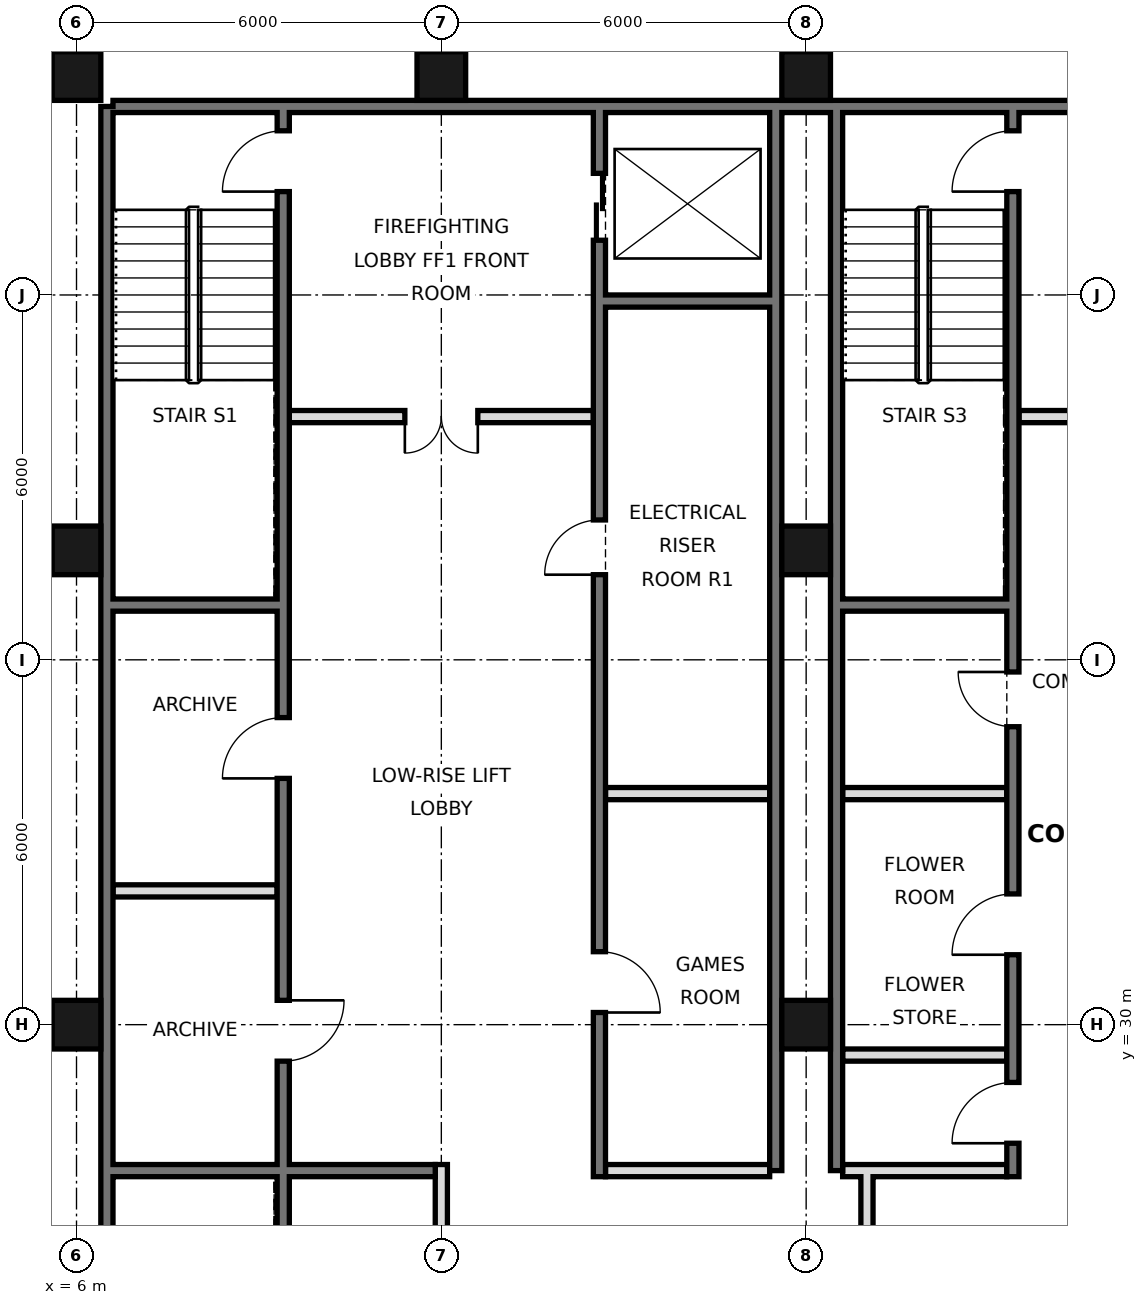
"""IFC4 building model, lengths in metres.
Left out: names, types, materials, properties, quantities, classifications, styles, units other than length and angle.
Written with IfcOpenShell. Run it as: python <this file> out.ifc"""

import sys

from ifc_helpers import new_model, si_unit, direction, frame, frame_2d, origin, origin_2d, place, context, subcontext, project, spatial, rectangle, hollow_rectangle, extrude, element, fill, save


model = new_model("IFC4")
c1 = context("Model", 3, precision=1e-05, world=origin(), true_north=direction((0.0, 1.0)))
c2 = subcontext(c1, "Body", "Model", "MODEL_VIEW")
j1 = project(units=[si_unit("LENGTHUNIT", "METRE"), si_unit("PLANEANGLEUNIT", "RADIAN")], contexts=[c1])
p1 = place(None, origin())
s1 = spatial("IfcSite", under=j1, at=p1, CompositionType="ELEMENT")
p2 = place(p1, origin())
s2 = spatial("IfcBuilding", under=s1, at=p2, CompositionType="ELEMENT")
p3 = place(p2, frame((0.0, 0.0, 308.8)))
s3 = spatial("IfcBuildingStorey", under=s2, at=p3, CompositionType="ELEMENT", Elevation=308.8)
for number, where, z_axis, x_axis in (
    (1, (6.0, 30.0, 0.0), (0.0, 0.0, 1.0), (1.0, 0.0, 0.0)),
    (2, (6.0, 37.8, 0.0), (0.0, 0.0, 1.0), (1.0, 0.0, 0.0)),
    (3, (6.0, 45.6, 0.0), (0.0, 0.0, 1.0), (1.0, 0.0, 0.0)),
    (4, (12.0, 45.6, 0.0), (0.0, 0.0, 1.0), (1.0, 0.0, 0.0)),
    (5, (18.0, 30.0, 0.0), (0.0, 0.0, 1.0), (1.0, 0.0, 0.0)),
    (6, (18.0, 37.8, 0.0), (0.0, 0.0, 1.0), (1.0, 0.0, 0.0)),
    (7, (18.0, 45.6, 0.0), (0.0, 0.0, 1.0), (1.0, 0.0, 0.0)),
):
    element("IfcColumn", number, at=place(p3, frame(where, z_axis=z_axis, x_axis=x_axis)), inside=s3, PredefinedType="COLUMN", context=c2, shape_type="SweptSolid", body=[
        extrude(hollow_rectangle(XDim=0.8, YDim=0.8, WallThickness=0.025, at=origin_2d()), origin(), (0.0, 0.0, 1.0), 3.6),
    ])
p4 = place(p3, frame((6.5, 21.6, 0.0), z_axis=(0.0, 0.0, 1.0), x_axis=(0.0, 1.0, 0.0)))
e8 = element("IfcWall", 8, at=p4, inside=s3, PredefinedType="SOLIDWALL", context=c2, shape_type="SweptSolid", body=[
    extrude(rectangle(XDim=23.5, YDim=0.2, at=frame_2d((11.75, 0.0))), origin(), (0.0, 0.0, 1.0), 3.42),
])
p5 = place(p3, frame((6.6, 45.1, 0.0), z_axis=(0.0, 0.0, 1.0), x_axis=(1.0, 0.0, 0.0)))
e9 = element("IfcWall", 9, at=p5, inside=s3, PredefinedType="SOLIDWALL", context=c2, shape_type="SweptSolid", body=[
    extrude(rectangle(XDim=34.8, YDim=0.2, at=frame_2d((17.4, 0.0))), origin(), (0.0, 0.0, 1.0), 3.42),
])
for number, where, z_axis, x_axis in (
    (10, (17.5, 27.6, 0.0), (0.0, 0.0, 1.0), (0.0, 1.0, 0.0)),
    (11, (18.5, 27.6, 0.0), (0.0, 0.0, 1.0), (0.0, 1.0, 0.0)),
):
    element("IfcWall", number, at=place(p3, frame(where, z_axis=z_axis, x_axis=x_axis)), inside=s3, PredefinedType="SOLIDWALL", context=c2, shape_type="SweptSolid", body=[
        extrude(rectangle(XDim=17.5, YDim=0.2, at=frame_2d((8.75, 0.0))), origin(), (0.0, 0.0, 1.0), 3.42),
    ])
p6 = place(p3, frame((19.0, 21.6, 0.0), z_axis=(0.0, 0.0, 1.0), x_axis=(0.0, 1.0, 0.0)))
e12 = element("IfcWall", 12, at=p6, inside=s3, PredefinedType="PARTITIONING", context=c2, shape_type="SweptSolid", body=[
    extrude(rectangle(XDim=6.0, YDim=0.2, at=frame_2d((3.0, 0.0))), origin(), (0.0, 0.0, 1.0), 3.42),
])
p7 = place(p6, frame((2.1, 0.0, 0.0)))
e13 = element("IfcOpeningElement", 13, at=p7, cuts=e12, PredefinedType="OPENING", context=c2, shape_type="SweptSolid", body=[
    extrude(rectangle(XDim=1.8, YDim=2.1, at=frame_2d((0.9, 1.05))), frame((0.0, 0.11, 0.0), z_axis=(0.0, -1.0, 0.0), x_axis=(1.0, 0.0, 0.0)), (0.0, 0.0, 1.0), 0.22),
])
p8 = place(p3, frame((12.0, 21.6, 0.0), z_axis=(0.0, 0.0, 1.0), x_axis=(0.0, 1.0, 0.0)))
e14 = element("IfcWall", 14, at=p8, inside=s3, PredefinedType="PARTITIONING", context=c2, shape_type="SweptSolid", body=[
    extrude(rectangle(XDim=6.1, YDim=0.2, at=frame_2d((3.05, 0.0))), origin(), (0.0, 0.0, 1.0), 3.42),
])
p9 = place(p3, frame((14.6, 27.5, 0.0), z_axis=(0.0, 0.0, 1.0), x_axis=(0.0, 1.0, 0.0)))
e15 = element("IfcWall", 15, at=p9, inside=s3, PredefinedType="SOLIDWALL", context=c2, shape_type="SweptSolid", body=[
    extrude(rectangle(XDim=17.5, YDim=0.2, at=frame_2d((8.75, 0.0))), origin(), (0.0, 0.0, 1.0), 3.42),
])
p10 = place(p9, frame((15.4, 0.0, 0.0)))
e16 = element("IfcOpeningElement", 16, at=p10, cuts=e15, PredefinedType="OPENING", context=c2, shape_type="SweptSolid", body=[
    extrude(rectangle(XDim=1.1, YDim=2.1, at=frame_2d((0.55, 1.05))), frame((0.0, 0.11, 0.0), z_axis=(0.0, -1.0, 0.0), x_axis=(1.0, 0.0, 0.0)), (0.0, 0.0, 1.0), 0.22),
])
p11 = place(p9, frame((2.7, 0.0, 0.0)))
e17 = element("IfcOpeningElement", 17, at=p11, cuts=e15, PredefinedType="OPENING", context=c2, shape_type="SweptSolid", body=[
    extrude(rectangle(XDim=1.0, YDim=2.1, at=frame_2d((0.5, 1.05))), frame((0.0, 0.11, 0.0), z_axis=(0.0, -1.0, 0.0), x_axis=(1.0, 0.0, 0.0)), (0.0, 0.0, 1.0), 0.22),
])
p12 = place(p9, frame((9.9, 0.0, 0.0)))
e18 = element("IfcOpeningElement", 18, at=p12, cuts=e15, PredefinedType="OPENING", context=c2, shape_type="SweptSolid", body=[
    extrude(rectangle(XDim=0.9, YDim=2.1, at=frame_2d((0.45, 1.05))), frame((0.0, 0.11, 0.0), z_axis=(0.0, -1.0, 0.0), x_axis=(1.0, 0.0, 0.0)), (0.0, 0.0, 1.0), 0.22),
])
p13 = place(p3, frame((21.4, 27.5, 0.0), z_axis=(0.0, 0.0, 1.0), x_axis=(0.0, 1.0, 0.0)))
e19 = element("IfcWall", 19, at=p13, inside=s3, PredefinedType="SOLIDWALL", context=c2, shape_type="SweptSolid", body=[
    extrude(rectangle(XDim=17.5, YDim=0.2, at=frame_2d((8.75, 0.0))), origin(), (0.0, 0.0, 1.0), 3.42),
])
p14 = place(p13, frame((0.55, 0.0, 0.0)))
e20 = element("IfcOpeningElement", 20, at=p14, cuts=e19, PredefinedType="OPENING", context=c2, shape_type="SweptSolid", body=[
    extrude(rectangle(XDim=1.0, YDim=2.1, at=frame_2d((0.5, 1.05))), frame((0.0, 0.11, 0.0), z_axis=(0.0, -1.0, 0.0), x_axis=(1.0, 0.0, 0.0)), (0.0, 0.0, 1.0), 0.22),
])
p15 = place(p13, frame((3.65, 0.0, 0.0)))
e21 = element("IfcOpeningElement", 21, at=p15, cuts=e19, PredefinedType="OPENING", context=c2, shape_type="SweptSolid", body=[
    extrude(rectangle(XDim=1.0, YDim=2.1, at=frame_2d((0.5, 1.05))), frame((0.0, 0.11, 0.0), z_axis=(0.0, -1.0, 0.0), x_axis=(1.0, 0.0, 0.0)), (0.0, 0.0, 1.0), 0.22),
])
p16 = place(p13, frame((16.2, 0.0, 0.0)))
e22 = element("IfcOpeningElement", 22, at=p16, cuts=e19, PredefinedType="OPENING", context=c2, shape_type="SweptSolid", body=[
    extrude(rectangle(XDim=1.0, YDim=2.1, at=frame_2d((0.5, 1.05))), frame((0.0, 0.11, 0.0), z_axis=(0.0, -1.0, 0.0), x_axis=(1.0, 0.0, 0.0)), (0.0, 0.0, 1.0), 0.22),
])
p17 = place(p13, frame((7.4, 0.0, 0.0)))
e23 = element("IfcOpeningElement", 23, at=p17, cuts=e19, PredefinedType="OPENING", context=c2, shape_type="SweptSolid", body=[
    extrude(rectangle(XDim=0.9, YDim=2.1, at=frame_2d((0.45, 1.05))), frame((0.0, 0.11, 0.0), z_axis=(0.0, -1.0, 0.0), x_axis=(1.0, 0.0, 0.0)), (0.0, 0.0, 1.0), 0.22),
])
p18 = place(p3, frame((9.4, 21.6, 0.0), z_axis=(0.0, 0.0, 1.0), x_axis=(0.0, 1.0, 0.0)))
e24 = element("IfcWall", 24, at=p18, inside=s3, PredefinedType="SOLIDWALL", context=c2, shape_type="SweptSolid", body=[
    extrude(rectangle(XDim=23.4, YDim=0.2, at=frame_2d((11.7, 0.0))), origin(), (0.0, 0.0, 1.0), 3.42),
])
p19 = place(p18, frame((7.8, 0.0, 0.0)))
e25 = element("IfcOpeningElement", 25, at=p19, cuts=e24, PredefinedType="OPENING", context=c2, shape_type="SweptSolid", body=[
    extrude(rectangle(XDim=1.0, YDim=2.1, at=frame_2d((0.5, 1.05))), frame((0.0, 0.11, 0.0), z_axis=(0.0, -1.0, 0.0), x_axis=(1.0, 0.0, 0.0)), (0.0, 0.0, 1.0), 0.22),
])
p20 = place(p18, frame((12.45, 0.0, 0.0)))
e26 = element("IfcOpeningElement", 26, at=p20, cuts=e24, PredefinedType="OPENING", context=c2, shape_type="SweptSolid", body=[
    extrude(rectangle(XDim=1.0, YDim=2.1, at=frame_2d((0.5, 1.05))), frame((0.0, 0.11, 0.0), z_axis=(0.0, -1.0, 0.0), x_axis=(1.0, 0.0, 0.0)), (0.0, 0.0, 1.0), 0.22),
])
p21 = place(p18, frame((22.1, 0.0, 0.0)))
e27 = element("IfcOpeningElement", 27, at=p21, cuts=e24, PredefinedType="OPENING", context=c2, shape_type="SweptSolid", body=[
    extrude(rectangle(XDim=1.0, YDim=2.1, at=frame_2d((0.5, 1.05))), frame((0.0, 0.11, 0.0), z_axis=(0.0, -1.0, 0.0), x_axis=(1.0, 0.0, 0.0)), (0.0, 0.0, 1.0), 0.22),
])
p22 = place(p18, frame((0.175, 0.0, 0.0)))
e28 = element("IfcOpeningElement", 28, at=p22, cuts=e24, PredefinedType="OPENING", context=c2, shape_type="SweptSolid", body=[
    extrude(rectangle(XDim=0.9, YDim=2.1, at=frame_2d((0.45, 1.05))), frame((0.0, 0.11, 0.0), z_axis=(0.0, -1.0, 0.0), x_axis=(1.0, 0.0, 0.0)), (0.0, 0.0, 1.0), 0.22),
])
for number, where, z_axis, x_axis in (
    (29, (14.7, 27.6, 0.0), (0.0, 0.0, 1.0), (1.0, 0.0, 0.0)),
    (30, (18.6, 27.6, 0.0), (0.0, 0.0, 1.0), (1.0, 0.0, 0.0)),
):
    element("IfcWall", number, at=place(p3, frame(where, z_axis=z_axis, x_axis=x_axis)), inside=s3, PredefinedType="PARTITIONING", context=c2, shape_type="SweptSolid", body=[
        extrude(rectangle(XDim=2.7, YDim=0.2, at=frame_2d((1.35, 0.0))), origin(), (0.0, 0.0, 1.0), 3.42),
    ])
p23 = place(p3, frame((6.6, 27.6, 0.0), z_axis=(0.0, 0.0, 1.0), x_axis=(1.0, 0.0, 0.0)))
e31 = element("IfcWall", 31, at=p23, inside=s3, PredefinedType="SOLIDWALL", context=c2, shape_type="SweptSolid", body=[
    extrude(rectangle(XDim=5.3, YDim=0.2, at=frame_2d((2.65, 0.0))), origin(), (0.0, 0.0, 1.0), 3.42),
])
for number, where, z_axis, x_axis in (
    (32, (18.6, 29.5, 0.0), (0.0, 0.0, 1.0), (1.0, 0.0, 0.0)),
    (33, (6.6, 32.2, 0.0), (0.0, 0.0, 1.0), (1.0, 0.0, 0.0)),
):
    element("IfcWall", number, at=place(p3, frame(where, z_axis=z_axis, x_axis=x_axis)), inside=s3, PredefinedType="PARTITIONING", context=c2, shape_type="SweptSolid", body=[
        extrude(rectangle(XDim=2.7, YDim=0.2, at=frame_2d((1.35, 0.0))), origin(), (0.0, 0.0, 1.0), 3.42),
    ])
for number, where, z_axis, x_axis in (
    (34, (14.7, 33.8, 0.0), (0.0, 0.0, 1.0), (1.0, 0.0, 0.0)),
    (35, (18.6, 33.8, 0.0), (0.0, 0.0, 1.0), (1.0, 0.0, 0.0)),
    (36, (18.6, 36.9, 0.0), (0.0, 0.0, 1.0), (1.0, 0.0, 0.0)),
    (37, (6.6, 36.9, 0.0), (0.0, 0.0, 1.0), (1.0, 0.0, 0.0)),
):
    element("IfcWall", number, at=place(p3, frame(where, z_axis=z_axis, x_axis=x_axis)), inside=s3, PredefinedType="SOLIDWALL", context=c2, shape_type="SweptSolid", body=[
        extrude(rectangle(XDim=2.7, YDim=0.2, at=frame_2d((1.35, 0.0))), origin(), (0.0, 0.0, 1.0), 3.42),
    ])
p24 = place(p3, frame((21.5, 40.0, 0.0), z_axis=(0.0, 0.0, 1.0), x_axis=(1.0, 0.0, 0.0)))
e38 = element("IfcWall", 38, at=p24, inside=s3, PredefinedType="PARTITIONING", context=c2, shape_type="SweptSolid", body=[
    extrude(rectangle(XDim=5.0, YDim=0.2, at=frame_2d((2.5, 0.0))), origin(), (0.0, 0.0, 1.0), 3.42),
])
p25 = place(p24, frame((1.9, 0.0, 0.0)))
e39 = element("IfcOpeningElement", 39, at=p25, cuts=e38, PredefinedType="OPENING", context=c2, shape_type="SweptSolid", body=[
    extrude(rectangle(XDim=1.2, YDim=2.1, at=frame_2d((0.6, 1.05))), frame((0.0, 0.11, 0.0), z_axis=(0.0, -1.0, 0.0), x_axis=(1.0, 0.0, 0.0)), (0.0, 0.0, 1.0), 0.22),
])
p26 = place(p3, frame((9.5, 40.0, 0.0), z_axis=(0.0, 0.0, 1.0), x_axis=(1.0, 0.0, 0.0)))
e40 = element("IfcWall", 40, at=p26, inside=s3, PredefinedType="PARTITIONING", context=c2, shape_type="SweptSolid", body=[
    extrude(rectangle(XDim=5.0, YDim=0.2, at=frame_2d((2.5, 0.0))), origin(), (0.0, 0.0, 1.0), 3.42),
])
p27 = place(p26, frame((1.9, 0.0, 0.0)))
e41 = element("IfcOpeningElement", 41, at=p27, cuts=e40, PredefinedType="OPENING", context=c2, shape_type="SweptSolid", body=[
    extrude(rectangle(XDim=1.2, YDim=2.1, at=frame_2d((0.6, 1.05))), frame((0.0, 0.11, 0.0), z_axis=(0.0, -1.0, 0.0), x_axis=(1.0, 0.0, 0.0)), (0.0, 0.0, 1.0), 0.22),
])
p28 = place(p3, frame((14.7, 41.9, 0.0), z_axis=(0.0, 0.0, 1.0), x_axis=(1.0, 0.0, 0.0)))
e42 = element("IfcWall", 42, at=p28, inside=s3, PredefinedType="SOLIDWALL", context=c2, shape_type="SweptSolid", body=[
    extrude(rectangle(XDim=2.7, YDim=0.2, at=frame_2d((1.35, 0.0))), origin(), (0.0, 0.0, 1.0), 3.42),
])
p29 = place(p27, frame((1.2, 0.0, 0.0), z_axis=(0.0, 0.0, 1.0), x_axis=(-1.0, 0.0, 0.0)))
e43 = element("IfcDoor", 43, at=p29, inside=s3, OperationType="DOUBLE_DOOR_SINGLE_SWING", PredefinedType="DOOR", context=c2, shape_type="SweptSolid", body=[
    extrude(rectangle(XDim=1.2, YDim=2.1, at=frame_2d((0.6, 1.05))), frame((0.0, 0.025, 0.0), z_axis=(0.0, -1.0, 0.0), x_axis=(1.0, 0.0, 0.0)), (0.0, 0.0, 1.0), 0.05),
])
fill(e41, e43)
p30 = place(p10, origin())
e44 = element("IfcDoor", 44, at=p30, inside=s3, OperationType="DOUBLE_DOOR_SLIDING", PredefinedType="DOOR", context=c2, shape_type="SweptSolid", body=[
    extrude(rectangle(XDim=1.1, YDim=2.1, at=frame_2d((0.55, 1.05))), frame((0.0, 0.025, 0.0), z_axis=(0.0, -1.0, 0.0), x_axis=(1.0, 0.0, 0.0)), (0.0, 0.0, 1.0), 0.05),
])
fill(e16, e44)
p31 = place(p14, origin())
e45 = element("IfcDoor", 45, at=p31, inside=s3, OperationType="SINGLE_SWING_LEFT", PredefinedType="DOOR", context=c2, shape_type="SweptSolid", body=[
    extrude(rectangle(XDim=1.0, YDim=2.1, at=frame_2d((0.5, 1.05))), frame((0.0, 0.025, 0.0), z_axis=(0.0, -1.0, 0.0), x_axis=(1.0, 0.0, 0.0)), (0.0, 0.0, 1.0), 0.05),
])
fill(e20, e45)
p32 = place(p15, origin())
e46 = element("IfcDoor", 46, at=p32, inside=s3, OperationType="SINGLE_SWING_LEFT", PredefinedType="DOOR", context=c2, shape_type="SweptSolid", body=[
    extrude(rectangle(XDim=1.0, YDim=2.1, at=frame_2d((0.5, 1.05))), frame((0.0, 0.025, 0.0), z_axis=(0.0, -1.0, 0.0), x_axis=(1.0, 0.0, 0.0)), (0.0, 0.0, 1.0), 0.05),
])
fill(e21, e46)
p33 = place(p11, frame((1.0, 0.0, 0.0), z_axis=(0.0, 0.0, 1.0), x_axis=(-1.0, 0.0, 0.0)))
e47 = element("IfcDoor", 47, at=p33, inside=s3, OperationType="SINGLE_SWING_RIGHT", PredefinedType="DOOR", context=c2, shape_type="SweptSolid", body=[
    extrude(rectangle(XDim=1.0, YDim=2.1, at=frame_2d((0.5, 1.05))), frame((0.0, 0.025, 0.0), z_axis=(0.0, -1.0, 0.0), x_axis=(1.0, 0.0, 0.0)), (0.0, 0.0, 1.0), 0.05),
])
fill(e17, e47)
p34 = place(p19, origin())
e48 = element("IfcDoor", 48, at=p34, inside=s3, OperationType="SINGLE_SWING_RIGHT", PredefinedType="DOOR", context=c2, shape_type="SweptSolid", body=[
    extrude(rectangle(XDim=1.0, YDim=2.1, at=frame_2d((0.5, 1.05))), frame((0.0, 0.025, 0.0), z_axis=(0.0, -1.0, 0.0), x_axis=(1.0, 0.0, 0.0)), (0.0, 0.0, 1.0), 0.05),
])
fill(e25, e48)
p35 = place(p20, origin())
e49 = element("IfcDoor", 49, at=p35, inside=s3, OperationType="SINGLE_SWING_LEFT", PredefinedType="DOOR", context=c2, shape_type="SweptSolid", body=[
    extrude(rectangle(XDim=1.0, YDim=2.1, at=frame_2d((0.5, 1.05))), frame((0.0, 0.025, 0.0), z_axis=(0.0, -1.0, 0.0), x_axis=(1.0, 0.0, 0.0)), (0.0, 0.0, 1.0), 0.05),
])
fill(e26, e49)
p36 = place(p21, origin())
e50 = element("IfcDoor", 50, at=p36, inside=s3, OperationType="SINGLE_SWING_LEFT", PredefinedType="DOOR", context=c2, shape_type="SweptSolid", body=[
    extrude(rectangle(XDim=1.0, YDim=2.1, at=frame_2d((0.5, 1.05))), frame((0.0, 0.025, 0.0), z_axis=(0.0, -1.0, 0.0), x_axis=(1.0, 0.0, 0.0)), (0.0, 0.0, 1.0), 0.05),
])
fill(e27, e50)
p37 = place(p16, origin())
e51 = element("IfcDoor", 51, at=p37, inside=s3, OperationType="SINGLE_SWING_LEFT", PredefinedType="DOOR", context=c2, shape_type="SweptSolid", body=[
    extrude(rectangle(XDim=1.0, YDim=2.1, at=frame_2d((0.5, 1.05))), frame((0.0, 0.025, 0.0), z_axis=(0.0, -1.0, 0.0), x_axis=(1.0, 0.0, 0.0)), (0.0, 0.0, 1.0), 0.05),
])
fill(e22, e51)
p38 = place(p12, origin())
e52 = element("IfcDoor", 52, at=p38, inside=s3, OperationType="SINGLE_SWING_LEFT", PredefinedType="DOOR", context=c2, shape_type="SweptSolid", body=[
    extrude(rectangle(XDim=0.9, YDim=2.1, at=frame_2d((0.45, 1.05))), frame((0.0, 0.025, 0.0), z_axis=(0.0, -1.0, 0.0), x_axis=(1.0, 0.0, 0.0)), (0.0, 0.0, 1.0), 0.05),
])
fill(e18, e52)
p39 = place(p17, frame((0.9, 0.0, 0.0), z_axis=(0.0, 0.0, 1.0), x_axis=(-1.0, 0.0, 0.0)))
e53 = element("IfcDoor", 53, at=p39, inside=s3, OperationType="SINGLE_SWING_LEFT", PredefinedType="DOOR", context=c2, shape_type="SweptSolid", body=[
    extrude(rectangle(XDim=0.9, YDim=2.1, at=frame_2d((0.45, 1.05))), frame((0.0, 0.025, 0.0), z_axis=(0.0, -1.0, 0.0), x_axis=(1.0, 0.0, 0.0)), (0.0, 0.0, 1.0), 0.05),
])
fill(e23, e53)
save(model, sys.argv[1])
